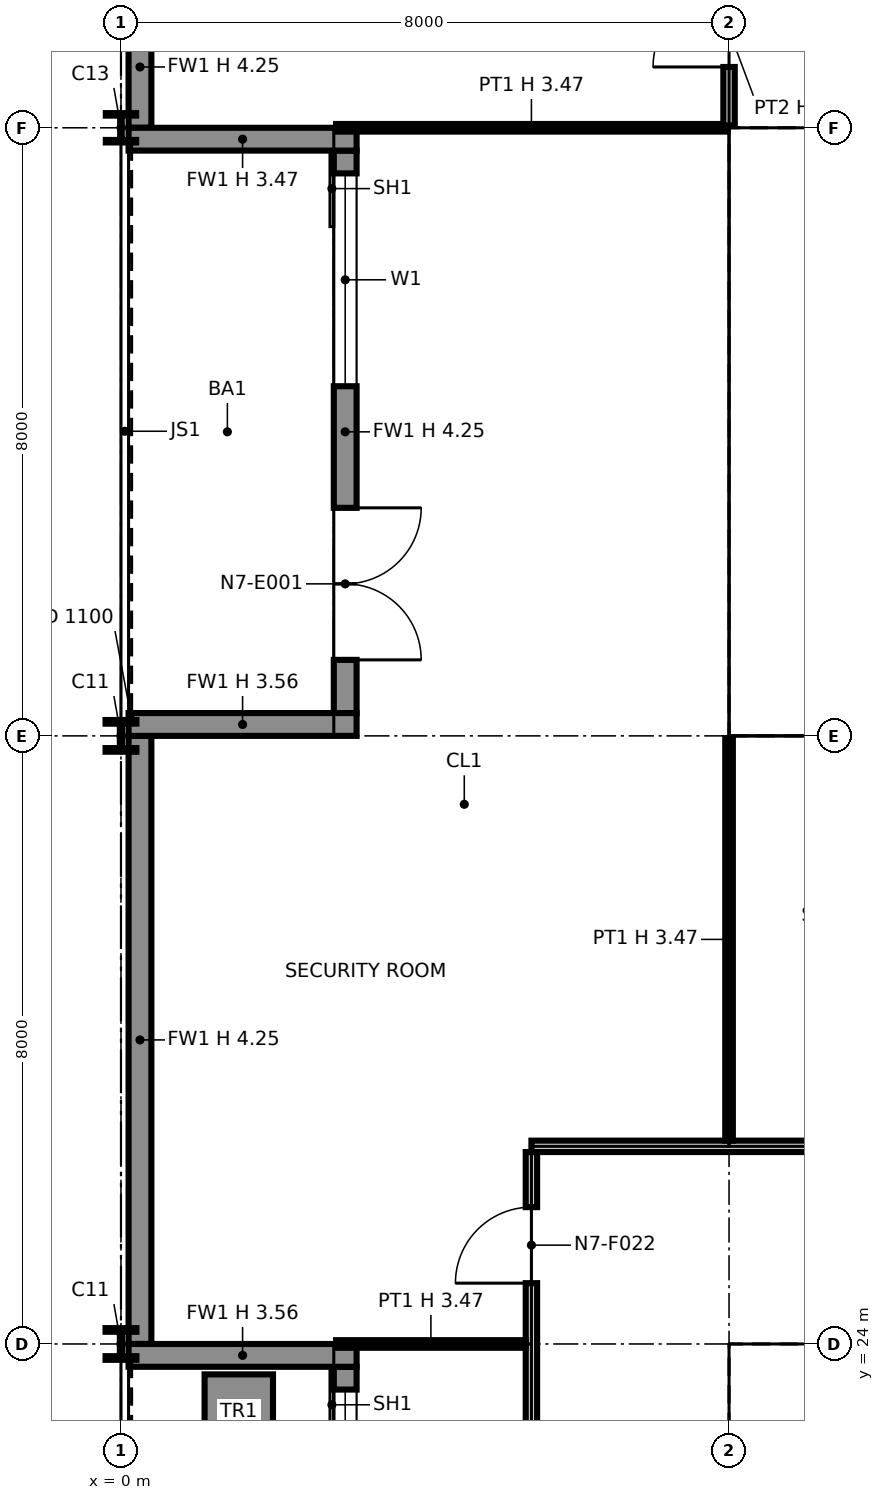
"""IFC4 building model, lengths in metres.
Left out: names, types, materials, properties, quantities, classifications, styles, units other than length and angle.
Written with IfcOpenShell. Run it as: python <this file> out.ifc"""

import sys

from ifc_helpers import new_model, si_unit, direction, frame, frame_2d, origin, origin_2d, place, context, subcontext, project, spatial, polyline, rectangle, i_section, outline, extrude, element, fill, save


model = new_model("IFC4")
c1 = context("Model", 3, precision=1e-05, world=origin(), true_north=direction((0.0, 1.0)))
c2 = subcontext(c1, "Body", "Model", "MODEL_VIEW")
j1 = project(units=[si_unit("LENGTHUNIT", "METRE"), si_unit("PLANEANGLEUNIT", "RADIAN")], contexts=[c1])
p1 = place(None, origin())
s1 = spatial("IfcSite", under=j1, at=p1, CompositionType="ELEMENT")
p2 = place(p1, origin())
s2 = spatial("IfcBuilding", under=s1, at=p2, CompositionType="ELEMENT")
p3 = place(p2, frame((0.0, 0.0, 105.2)))
s3 = spatial("IfcBuildingStorey", under=s2, at=p3, CompositionType="ELEMENT", Elevation=105.2)
for number, where, z_axis, x_axis in (
    (1, (0.0, 24.0, 0.0), (0.0, 0.0, 1.0), (1.0, 0.0, 0.0)),
    (2, (0.0, 32.0, 0.0), (0.0, 0.0, 1.0), (1.0, 0.0, 0.0)),
):
    element("IfcColumn", number, at=place(p3, frame(where, z_axis=z_axis, x_axis=x_axis)), inside=s3, PredefinedType="COLUMN", context=c2, shape_type="SweptSolid", body=[
        extrude(i_section(OverallWidth=0.406, OverallDepth=0.417, WebThickness=0.03, FlangeThickness=0.048, at=origin_2d()), origin(), (0.0, 0.0, 1.0), 4.25),
    ])
p4 = place(p3, frame((0.0, 40.0, 0.0), z_axis=(0.0, 0.0, 1.0), x_axis=(1.0, 0.0, 0.0)))
e3 = element("IfcColumn", 3, at=p4, inside=s3, PredefinedType="COLUMN", context=c2, shape_type="SweptSolid", body=[
    extrude(i_section(OverallWidth=0.399, OverallDepth=0.386, WebThickness=0.021, FlangeThickness=0.033, at=origin_2d()), origin(), (0.0, 0.0, 1.0), 4.25),
])
p5 = place(p3, frame((8.0, 24.0, 0.0), z_axis=(0.0, 0.0, 1.0), x_axis=(1.0, 0.0, 0.0)))
e4 = element("IfcColumn", 4, at=p5, inside=s3, PredefinedType="COLUMN", context=c2, shape_type="SweptSolid", body=[
    extrude(i_section(OverallWidth=0.411, OverallDepth=0.434, WebThickness=0.036, FlangeThickness=0.057, at=origin_2d()), origin(), (0.0, 0.0, 1.0), 4.25),
])
for number, where, z_axis, x_axis in (
    (5, (8.0, 32.0, 0.0), (0.0, 0.0, 1.0), (1.0, 0.0, 0.0)),
    (6, (8.0, 40.0, 0.0), (0.0, 0.0, 1.0), (1.0, 0.0, 0.0)),
):
    element("IfcColumn", number, at=place(p3, frame(where, z_axis=z_axis, x_axis=x_axis)), inside=s3, PredefinedType="COLUMN", context=c2, shape_type="SweptSolid", body=[
        extrude(i_section(OverallWidth=0.373, OverallDepth=0.368, WebThickness=0.015, FlangeThickness=0.024, at=origin_2d()), origin(), (0.0, 0.0, 1.0), 4.25),
    ])
p6 = place(p3, frame((0.25, 41.6, 0.0), z_axis=(0.0, 0.0, 1.0), x_axis=(0.0, -1.0, 0.0)))
e7 = element("IfcWall", 7, at=p6, inside=s3, PredefinedType="SOLIDWALL", context=c2, shape_type="SweptSolid", body=[
    extrude(rectangle(XDim=1.6, YDim=0.3, at=frame_2d((0.8, 0.0))), origin(), (0.0, 0.0, 1.0), 4.25),
])
p7 = place(p3, frame((2.95, 39.7, 0.0), z_axis=(0.0, 0.0, 1.0), x_axis=(0.0, -1.0, 0.0)))
e8 = element("IfcWall", 8, at=p7, inside=s3, PredefinedType="SOLIDWALL", context=c2, shape_type="SweptSolid", body=[
    extrude(rectangle(XDim=7.4, YDim=0.3, at=frame_2d((3.7, 0.0))), origin(), (0.0, 0.0, 1.0), 4.25),
])
p8 = place(p7, frame((0.3, 0.0, 0.9)))
e9 = element("IfcOpeningElement", 9, at=p8, cuts=e8, PredefinedType="OPENING", context=c2, shape_type="SweptSolid", body=[
    extrude(rectangle(XDim=2.8, YDim=2.2, at=frame_2d((1.4, 1.1))), frame((0.0, 0.16, 0.0), z_axis=(0.0, -1.0, 0.0), x_axis=(1.0, 0.0, 0.0)), (0.0, 0.0, 1.0), 0.32),
])
p9 = place(p7, frame((4.7, 0.0, 0.0)))
e10 = element("IfcOpeningElement", 10, at=p9, cuts=e8, PredefinedType="OPENING", context=c2, shape_type="SweptSolid", body=[
    extrude(rectangle(XDim=2.0, YDim=2.4, at=frame_2d((1.0, 1.2))), frame((0.0, 0.16, 0.0), z_axis=(0.0, -1.0, 0.0), x_axis=(1.0, 0.0, 0.0)), (0.0, 0.0, 1.0), 0.32),
])
p10 = place(p3, frame((0.1, 39.85, 0.0), z_axis=(0.0, 0.0, 1.0), x_axis=(1.0, 0.0, 0.0)))
e11 = element("IfcWall", 11, at=p10, inside=s3, PredefinedType="SOLIDWALL", context=c2, shape_type="SweptSolid", body=[
    extrude(rectangle(XDim=3.0, YDim=0.3, at=frame_2d((1.5, 0.0))), origin(), (0.0, 0.0, 1.0), 3.469),
])
p11 = place(p3, frame((0.1, 32.15, 0.0), z_axis=(0.0, 0.0, 1.0), x_axis=(1.0, 0.0, 0.0)))
e12 = element("IfcWall", 12, at=p11, inside=s3, PredefinedType="SOLIDWALL", context=c2, shape_type="SweptSolid", body=[
    extrude(rectangle(XDim=3.0, YDim=0.3, at=frame_2d((1.5, 0.0))), origin(), (0.0, 0.0, 1.0), 3.556),
])
p12 = place(p3, frame((0.25, 32.0, 0.0), z_axis=(0.0, 0.0, 1.0), x_axis=(0.0, -1.0, 0.0)))
e13 = element("IfcWall", 13, at=p12, inside=s3, PredefinedType="SOLIDWALL", context=c2, shape_type="SweptSolid", body=[
    extrude(rectangle(XDim=8.0, YDim=0.3, at=frame_2d((4.0, 0.0))), origin(), (0.0, 0.0, 1.0), 4.25),
])
p13 = place(p3, frame((2.95, 23.7, 0.0), z_axis=(0.0, 0.0, 1.0), x_axis=(0.0, -1.0, 0.0)))
e14 = element("IfcWall", 14, at=p13, inside=s3, PredefinedType="SOLIDWALL", context=c2, shape_type="SweptSolid", body=[
    extrude(rectangle(XDim=7.4, YDim=0.3, at=frame_2d((3.7, 0.0))), origin(), (0.0, 0.0, 1.0), 4.25),
])
p14 = place(p13, frame((0.3, 0.0, 0.9)))
e15 = element("IfcOpeningElement", 15, at=p14, cuts=e14, PredefinedType="OPENING", context=c2, shape_type="SweptSolid", body=[
    extrude(rectangle(XDim=2.8, YDim=2.2, at=frame_2d((1.4, 1.1))), frame((0.0, 0.16, 0.0), z_axis=(0.0, -1.0, 0.0), x_axis=(1.0, 0.0, 0.0)), (0.0, 0.0, 1.0), 0.32),
])
p15 = place(p13, frame((4.7, 0.0, 0.0)))
e16 = element("IfcOpeningElement", 16, at=p15, cuts=e14, PredefinedType="OPENING", context=c2, shape_type="SweptSolid", body=[
    extrude(rectangle(XDim=2.0, YDim=2.4, at=frame_2d((1.0, 1.2))), frame((0.0, 0.16, 0.0), z_axis=(0.0, -1.0, 0.0), x_axis=(1.0, 0.0, 0.0)), (0.0, 0.0, 1.0), 0.32),
])
p16 = place(p3, frame((0.1, 23.85, 0.0), z_axis=(0.0, 0.0, 1.0), x_axis=(1.0, 0.0, 0.0)))
e17 = element("IfcWall", 17, at=p16, inside=s3, PredefinedType="SOLIDWALL", context=c2, shape_type="SweptSolid", body=[
    extrude(rectangle(XDim=3.0, YDim=0.3, at=frame_2d((1.5, 0.0))), origin(), (0.0, 0.0, 1.0), 3.556),
])
p17 = place(p3, frame((1.55, 23.6, 0.0), z_axis=(0.0, 0.0, 1.0), x_axis=(0.0, -1.0, 0.0)))
e18 = element("IfcWall", 18, at=p17, inside=s3, PredefinedType="SOLIDWALL", context=c2, shape_type="SweptSolid", body=[
    extrude(rectangle(XDim=3.2, YDim=0.9, at=frame_2d((1.6, 0.0))), origin(), (0.0, 0.0, 1.0), 0.6),
])
p18 = place(p3, frame((8.75, 8.85, 0.0), z_axis=(0.0, 0.0, 1.0), x_axis=(0.0, 1.0, 0.0)))
e19 = element("IfcWall", 19, at=p18, inside=s3, PredefinedType="PARTITIONING", context=c2, shape_type="SweptSolid", body=[
    extrude(outline(polyline([(0.0, 0.0), (14.3, 0.0), (14.3, 4.25), (10.231, 4.25), (10.23, 3.789), (10.07, 3.789), (10.069, 4.25), (7.27, 4.25), (7.269, 3.632), (7.031, 3.632), (7.031, 4.25), (0.0, 4.25), (0.0, 0.0)])), frame((0.0, 0.1, 0.0), z_axis=(0.0, -1.0, 0.0), x_axis=(1.0, 0.0, 0.0)), (0.0, 0.0, 1.0), 0.2),
])
p19 = place(p18, frame((8.3, 0.0, 0.0)))
e20 = element("IfcOpeningElement", 20, at=p19, cuts=e19, PredefinedType="OPENING", context=c2, shape_type="SweptSolid", body=[
    extrude(rectangle(XDim=1.8, YDim=2.1, at=frame_2d((0.9, 1.05))), frame((0.0, 0.11, 0.0), z_axis=(0.0, -1.0, 0.0), x_axis=(1.0, 0.0, 0.0)), (0.0, 0.0, 1.0), 0.22),
])
p20 = place(p3, frame((8.65, 23.25, 0.0), z_axis=(0.0, 0.0, 1.0), x_axis=(1.0, 0.0, 0.0)))
e21 = element("IfcWall", 21, at=p20, inside=s3, PredefinedType="PARTITIONING", context=c2, shape_type="SweptSolid", body=[
    extrude(outline(polyline([(0.0, 0.0), (14.7, 0.0), (14.7, 4.25), (7.469, 4.25), (7.469, 3.632), (7.231, 3.632), (7.23, 4.25), (0.0, 4.25), (0.0, 0.0)])), frame((0.0, 0.1, 0.0), z_axis=(0.0, -1.0, 0.0), x_axis=(1.0, 0.0, 0.0)), (0.0, 0.0, 1.0), 0.2),
])
p21 = place(p3, frame((8.65, 32.75, 0.0), z_axis=(0.0, 0.0, 1.0), x_axis=(1.0, 0.0, 0.0)))
e22 = element("IfcWall", 22, at=p21, inside=s3, PredefinedType="PARTITIONING", context=c2, shape_type="SweptSolid", body=[
    extrude(outline(polyline([(0.0, 0.0), (14.7, 0.0), (14.7, 4.25), (7.469, 4.25), (7.469, 3.632), (7.231, 3.632), (7.23, 4.25), (0.0, 4.25), (0.0, 0.0)])), frame((0.0, 0.1, 0.0), z_axis=(0.0, -1.0, 0.0), x_axis=(1.0, 0.0, 0.0)), (0.0, 0.0, 1.0), 0.2),
])
p22 = place(p21, frame((4.05, 0.0, 0.0)))
e23 = element("IfcOpeningElement", 23, at=p22, cuts=e22, PredefinedType="OPENING", context=c2, shape_type="SweptSolid", body=[
    extrude(rectangle(XDim=1.8, YDim=2.1, at=frame_2d((0.9, 1.05))), frame((0.0, 0.11, 0.0), z_axis=(0.0, -1.0, 0.0), x_axis=(1.0, 0.0, 0.0)), (0.0, 0.0, 1.0), 0.22),
])
p23 = place(p21, frame((8.35, 0.0, 0.0)))
e24 = element("IfcOpeningElement", 24, at=p23, cuts=e22, PredefinedType="OPENING", context=c2, shape_type="SweptSolid", body=[
    extrude(rectangle(XDim=1.4, YDim=2.1, at=frame_2d((0.7, 1.05))), frame((0.0, 0.11, 0.0), z_axis=(0.0, -1.0, 0.0), x_axis=(1.0, 0.0, 0.0)), (0.0, 0.0, 1.0), 0.22),
])
p24 = place(p21, frame((10.85, 0.0, 0.0)))
e25 = element("IfcOpeningElement", 25, at=p24, cuts=e22, PredefinedType="OPENING", context=c2, shape_type="SweptSolid", body=[
    extrude(rectangle(XDim=1.4, YDim=2.1, at=frame_2d((0.7, 1.05))), frame((0.0, 0.11, 0.0), z_axis=(0.0, -1.0, 0.0), x_axis=(1.0, 0.0, 0.0)), (0.0, 0.0, 1.0), 0.22),
])
p25 = place(p3, frame((8.75, 32.85, 0.0), z_axis=(0.0, 0.0, 1.0), x_axis=(0.0, 1.0, 0.0)))
e26 = element("IfcWall", 26, at=p25, inside=s3, PredefinedType="PARTITIONING", context=c2, shape_type="SweptSolid", body=[
    extrude(outline(polyline([(0.0, 0.0), (6.3, 0.0), (6.3, 4.25), (3.231, 4.25), (3.23, 3.789), (3.07, 3.789), (3.069, 4.25), (0.0, 4.25), (0.0, 0.0)])), frame((0.0, 0.1, 0.0), z_axis=(0.0, -1.0, 0.0), x_axis=(1.0, 0.0, 0.0)), (0.0, 0.0, 1.0), 0.2),
])
p26 = place(p3, frame((8.65, 39.25, 0.0), z_axis=(0.0, 0.0, 1.0), x_axis=(1.0, 0.0, 0.0)))
e27 = element("IfcWall", 27, at=p26, inside=s3, PredefinedType="PARTITIONING", context=c2, shape_type="SweptSolid", body=[
    extrude(outline(polyline([(0.0, 0.0), (14.7, 0.0), (14.7, 4.25), (7.469, 4.25), (7.469, 3.632), (7.231, 3.632), (7.23, 4.25), (0.0, 4.25), (0.0, 0.0)])), frame((0.0, 0.1, 0.0), z_axis=(0.0, -1.0, 0.0), x_axis=(1.0, 0.0, 0.0)), (0.0, 0.0, 1.0), 0.2),
])
p27 = place(p3, frame((8.85, 34.875, 0.0), z_axis=(0.0, 0.0, 1.0), x_axis=(1.0, 0.0, 0.0)))
e28 = element("IfcWall", 28, at=p27, inside=s3, PredefinedType="PARTITIONING", context=c2, shape_type="SweptSolid", body=[
    extrude(outline(polyline([(0.0, 0.0), (7.45, 0.0), (7.45, 4.25), (7.27, 4.25), (7.269, 3.632), (7.031, 3.632), (7.031, 4.25), (0.0, 4.25), (0.0, 0.0)])), frame((0.0, 0.075, 0.0), z_axis=(0.0, -1.0, 0.0), x_axis=(1.0, 0.0, 0.0)), (0.0, 0.0, 1.0), 0.15),
])
p28 = place(p27, frame((1.1, 0.0, 0.0)))
e29 = element("IfcOpeningElement", 29, at=p28, cuts=e28, PredefinedType="OPENING", context=c2, shape_type="SweptSolid", body=[
    extrude(rectangle(XDim=0.9, YDim=2.1, at=frame_2d((0.45, 1.05))), frame((0.0, 0.085, 0.0), z_axis=(0.0, -1.0, 0.0), x_axis=(1.0, 0.0, 0.0)), (0.0, 0.0, 1.0), 0.17),
])
p29 = place(p27, frame((3.6, 0.0, 0.0)))
e30 = element("IfcOpeningElement", 30, at=p29, cuts=e28, PredefinedType="OPENING", context=c2, shape_type="SweptSolid", body=[
    extrude(rectangle(XDim=0.9, YDim=2.1, at=frame_2d((0.45, 1.05))), frame((0.0, 0.085, 0.0), z_axis=(0.0, -1.0, 0.0), x_axis=(1.0, 0.0, 0.0)), (0.0, 0.0, 1.0), 0.17),
])
p30 = place(p27, frame((5.55, 0.0, 0.0)))
e31 = element("IfcOpeningElement", 31, at=p30, cuts=e28, PredefinedType="OPENING", context=c2, shape_type="SweptSolid", body=[
    extrude(rectangle(XDim=0.9, YDim=2.1, at=frame_2d((0.45, 1.05))), frame((0.0, 0.085, 0.0), z_axis=(0.0, -1.0, 0.0), x_axis=(1.0, 0.0, 0.0)), (0.0, 0.0, 1.0), 0.17),
])
p31 = place(p3, frame((5.4, 5.4, 0.0), z_axis=(0.0, 0.0, 1.0), x_axis=(0.0, 1.0, 0.0)))
e32 = element("IfcWall", 32, at=p31, inside=s3, PredefinedType="PARTITIONING", context=c2, shape_type="SweptSolid", body=[
    extrude(outline(polyline([(0.0, 0.0), (21.125, 0.0), (21.125, 4.25), (18.9, 4.25), (18.898, 3.47), (18.302, 3.47), (18.3, 4.25), (14.9, 4.25), (14.898, 3.47), (14.302, 3.47), (14.3, 4.25), (10.9, 4.25), (10.898, 3.47), (10.302, 3.47), (10.3, 4.25), (6.9, 4.25), (6.898, 3.47), (6.302, 3.47), (6.3, 4.25), (2.9, 4.25), (2.898, 3.47), (2.302, 3.47), (2.3, 4.25), (0.0, 4.25), (0.0, 0.0)])), frame((0.0, 0.075, 0.0), z_axis=(0.0, -1.0, 0.0), x_axis=(1.0, 0.0, 0.0)), (0.0, 0.0, 1.0), 0.15),
])
p32 = place(p31, frame((6.1, 0.0, 0.0)))
e33 = element("IfcOpeningElement", 33, at=p32, cuts=e32, PredefinedType="OPENING", context=c2, shape_type="SweptSolid", body=[
    extrude(rectangle(XDim=1.0, YDim=2.1, at=frame_2d((0.5, 1.05))), frame((0.0, 0.085, 0.0), z_axis=(0.0, -1.0, 0.0), x_axis=(1.0, 0.0, 0.0)), (0.0, 0.0, 1.0), 0.17),
])
p33 = place(p31, frame((11.825, 0.0, 0.0)))
e34 = element("IfcOpeningElement", 34, at=p33, cuts=e32, PredefinedType="OPENING", context=c2, shape_type="SweptSolid", body=[
    extrude(rectangle(XDim=1.0, YDim=2.1, at=frame_2d((0.5, 1.05))), frame((0.0, 0.085, 0.0), z_axis=(0.0, -1.0, 0.0), x_axis=(1.0, 0.0, 0.0)), (0.0, 0.0, 1.0), 0.17),
])
p34 = place(p31, frame((16.1, 0.0, 0.0)))
e35 = element("IfcOpeningElement", 35, at=p34, cuts=e32, PredefinedType="OPENING", context=c2, shape_type="SweptSolid", body=[
    extrude(rectangle(XDim=1.0, YDim=2.1, at=frame_2d((0.5, 1.05))), frame((0.0, 0.085, 0.0), z_axis=(0.0, -1.0, 0.0), x_axis=(1.0, 0.0, 0.0)), (0.0, 0.0, 1.0), 0.17),
])
p35 = place(p31, frame((19.4, 0.0, 0.0)))
e36 = element("IfcOpeningElement", 36, at=p35, cuts=e32, PredefinedType="OPENING", context=c2, shape_type="SweptSolid", body=[
    extrude(rectangle(XDim=1.0, YDim=2.1, at=frame_2d((0.5, 1.05))), frame((0.0, 0.085, 0.0), z_axis=(0.0, -1.0, 0.0), x_axis=(1.0, 0.0, 0.0)), (0.0, 0.0, 1.0), 0.17),
])
p36 = place(p3, frame((2.83, 24.0, 0.0), z_axis=(0.0, 0.0, 1.0), x_axis=(1.0, 0.0, 0.0)))
e37 = element("IfcWall", 37, at=p36, inside=s3, PredefinedType="PARTITIONING", context=c2, shape_type="SweptSolid", body=[
    extrude(rectangle(XDim=2.495, YDim=0.1, at=frame_2d((1.248, 0.0))), origin(), (0.0, 0.0, 1.0), 3.47),
])
p37 = place(p3, frame((5.4, 26.6, 0.0), z_axis=(0.0, 0.0, 1.0), x_axis=(1.0, 0.0, 0.0)))
e38 = element("IfcWall", 38, at=p37, inside=s3, PredefinedType="PARTITIONING", context=c2, shape_type="SweptSolid", body=[
    extrude(rectangle(XDim=18.525, YDim=0.15, at=frame_2d((9.263, 0.0))), origin(), (0.0, 0.0, 1.0), 4.25),
])
p38 = place(p37, frame((6.1, 0.0, 0.0)))
e39 = element("IfcOpeningElement", 39, at=p38, cuts=e38, PredefinedType="OPENING", context=c2, shape_type="SweptSolid", body=[
    extrude(rectangle(XDim=1.0, YDim=2.1, at=frame_2d((0.5, 1.05))), frame((0.0, 0.085, 0.0), z_axis=(0.0, -1.0, 0.0), x_axis=(1.0, 0.0, 0.0)), (0.0, 0.0, 1.0), 0.17),
])
p39 = place(p3, frame((8.0, 26.675, 0.0), z_axis=(0.0, 0.0, 1.0), x_axis=(0.0, 1.0, 0.0)))
e40 = element("IfcWall", 40, at=p39, inside=s3, PredefinedType="PARTITIONING", context=c2, shape_type="SweptSolid", body=[
    extrude(rectangle(XDim=5.295, YDim=0.1, at=frame_2d((2.647, 0.0))), origin(), (0.0, 0.0, 1.0), 3.47),
])
p40 = place(p3, frame((2.83, 40.0, 0.0), z_axis=(0.0, 0.0, 1.0), x_axis=(1.0, 0.0, 0.0)))
e41 = element("IfcWall", 41, at=p40, inside=s3, PredefinedType="PARTITIONING", context=c2, shape_type="SweptSolid", body=[
    extrude(rectangle(XDim=5.14, YDim=0.1, at=frame_2d((2.57, 0.0))), origin(), (0.0, 0.0, 1.0), 3.47),
])
p41 = place(p3, frame((8.0, 40.03, 0.0), z_axis=(0.0, 0.0, 1.0), x_axis=(0.0, 1.0, 0.0)))
e42 = element("IfcWall", 42, at=p41, inside=s3, PredefinedType="PARTITIONING", context=c2, shape_type="SweptSolid", body=[
    extrude(rectangle(XDim=2.495, YDim=0.15, at=frame_2d((1.248, 0.0))), origin(), (0.0, 0.0, 1.0), 3.47),
])
p42 = place(p41, frame((0.77, 0.0, 0.0)))
e43 = element("IfcOpeningElement", 43, at=p42, cuts=e42, PredefinedType="OPENING", context=c2, shape_type="SweptSolid", body=[
    extrude(rectangle(XDim=1.0, YDim=2.1, at=frame_2d((0.5, 1.05))), frame((0.0, 0.085, 0.0), z_axis=(0.0, -1.0, 0.0), x_axis=(1.0, 0.0, 0.0)), (0.0, 0.0, 1.0), 0.17),
])
p43 = place(p8, origin())
e44 = element("IfcWindow", 44, at=p43, inside=s3, PartitioningType="SINGLE_PANEL", PredefinedType="WINDOW", context=c2, shape_type="SweptSolid", body=[
    extrude(rectangle(XDim=2.8, YDim=2.2, at=frame_2d((1.4, 1.1))), frame((0.0, 0.03, 0.0), z_axis=(0.0, -1.0, 0.0), x_axis=(1.0, 0.0, 0.0)), (0.0, 0.0, 1.0), 0.06),
])
fill(e9, e44)
p44 = place(p9, origin())
e45 = element("IfcDoor", 45, at=p44, inside=s3, OperationType="DOUBLE_DOOR_SINGLE_SWING", PredefinedType="DOOR", context=c2, shape_type="SweptSolid", body=[
    extrude(rectangle(XDim=2.0, YDim=2.4, at=frame_2d((1.0, 1.2))), frame((0.0, 0.025, 0.0), z_axis=(0.0, -1.0, 0.0), x_axis=(1.0, 0.0, 0.0)), (0.0, 0.0, 1.0), 0.05),
])
fill(e10, e45)
p45 = place(p14, origin())
e46 = element("IfcWindow", 46, at=p45, inside=s3, PartitioningType="SINGLE_PANEL", PredefinedType="WINDOW", context=c2, shape_type="SweptSolid", body=[
    extrude(rectangle(XDim=2.8, YDim=2.2, at=frame_2d((1.4, 1.1))), frame((0.0, 0.03, 0.0), z_axis=(0.0, -1.0, 0.0), x_axis=(1.0, 0.0, 0.0)), (0.0, 0.0, 1.0), 0.06),
])
fill(e15, e46)
p46 = place(p35, origin())
e47 = element("IfcDoor", 47, at=p46, inside=s3, OperationType="SINGLE_SWING_LEFT", PredefinedType="DOOR", context=c2, shape_type="SweptSolid", body=[
    extrude(rectangle(XDim=1.0, YDim=2.1, at=frame_2d((0.5, 1.05))), frame((0.0, 0.025, 0.0), z_axis=(0.0, -1.0, 0.0), x_axis=(1.0, 0.0, 0.0)), (0.0, 0.0, 1.0), 0.05),
])
fill(e36, e47)
p47 = place(p42, origin())
e48 = element("IfcDoor", 48, at=p47, inside=s3, OperationType="SINGLE_SWING_LEFT", PredefinedType="DOOR", context=c2, shape_type="SweptSolid", body=[
    extrude(rectangle(XDim=1.0, YDim=2.1, at=frame_2d((0.5, 1.05))), frame((0.0, 0.025, 0.0), z_axis=(0.0, -1.0, 0.0), x_axis=(1.0, 0.0, 0.0)), (0.0, 0.0, 1.0), 0.05),
])
fill(e43, e48)
save(model, sys.argv[1])
